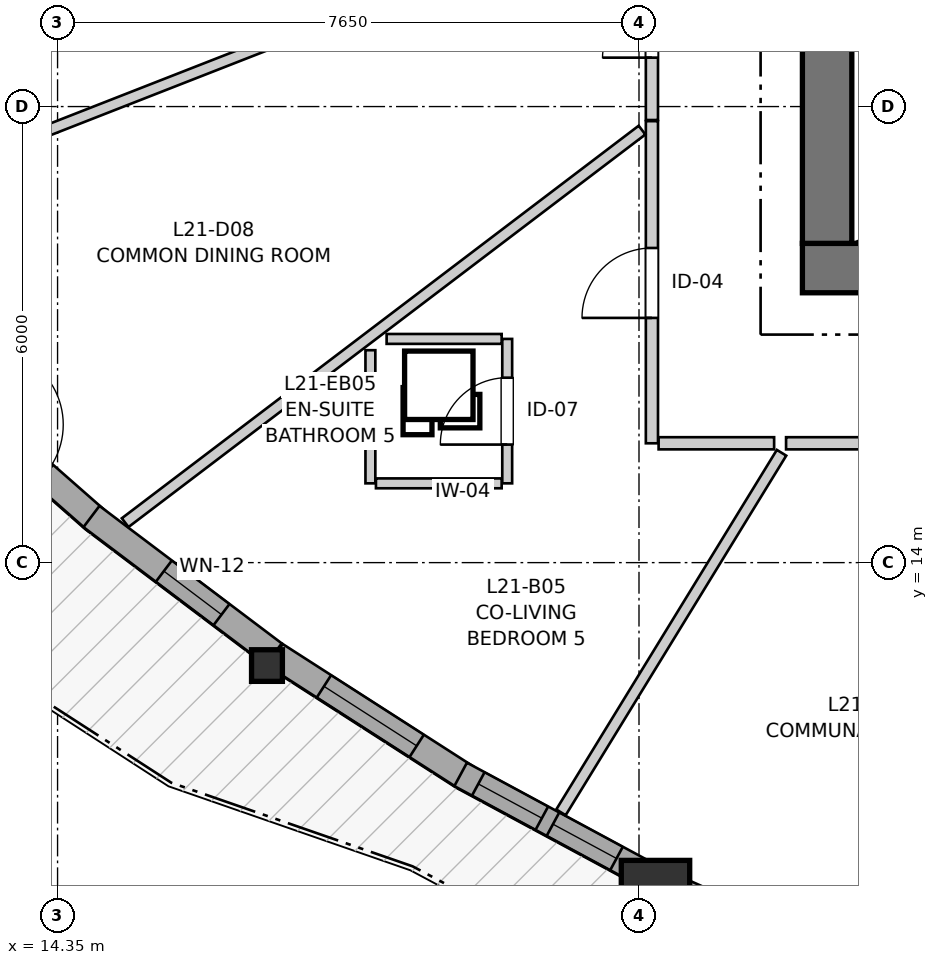
"""IFC4 building model, lengths in metres.
Left out: names, types, materials, properties, quantities, classifications, styles, units other than length and angle.
Written with IfcOpenShell. Run it as: python <this file> out.ifc"""

import sys

from ifc_helpers import new_model, si_unit, direction, frame, frame_2d, origin, origin_2d, place, context, subcontext, project, spatial, rectangle, i_section, extrude, source, transform, mapped, element, fill, save


model = new_model("IFC4")
c1 = context("Model", 3, precision=1e-05, world=origin(), true_north=direction((0.0, 1.0)))
c2 = subcontext(c1, "Body", "Model", "MODEL_VIEW")
j1 = project(units=[si_unit("LENGTHUNIT", "METRE"), si_unit("PLANEANGLEUNIT", "RADIAN")], contexts=[c1])
p1 = place(None, origin())
s1 = spatial("IfcSite", under=j1, at=p1, CompositionType="ELEMENT")
p2 = place(p1, origin())
s2 = spatial("IfcBuilding", under=s1, at=p2, CompositionType="ELEMENT")
p3 = place(p2, frame((0.0, 0.0, 73.6)))
s3 = spatial("IfcBuildingStorey", under=s2, at=p3, CompositionType="ELEMENT", Elevation=73.6)
p4 = place(p3, frame((24.15, 17.875, 0.0), z_axis=(0.0, 0.0, 1.0), x_axis=(1.0, 0.0, 0.0)))
e1 = element("IfcWall", 1, at=p4, inside=s3, PredefinedType="SHEAR", context=c2, shape_type="SweptSolid", body=[
    extrude(rectangle(XDim=12.4, YDim=0.65, at=frame_2d((6.2, 0.0))), origin(), (0.0, 0.0, 1.0), 2.95),
])
p5 = place(p3, frame((24.475, 33.8, 0.0), z_axis=(0.0, 0.0, 1.0), x_axis=(0.0, -1.0, 0.0)))
e2 = element("IfcWall", 2, at=p5, inside=s3, PredefinedType="SHEAR", context=c2, shape_type="SweptSolid", body=[
    extrude(rectangle(XDim=15.6, YDim=0.65, at=frame_2d((7.8, 0.0))), origin(), (0.0, 0.0, 1.0), 2.95),
])
p6 = place(p5, frame((7.05, 0.0, 0.0)))
e3 = element("IfcOpeningElement", 3, at=p6, cuts=e2, PredefinedType="OPENING", context=c2, shape_type="SweptSolid", body=[
    extrude(rectangle(XDim=1.5, YDim=2.15, at=frame_2d((0.75, 1.075))), frame((0.0, 0.335, 0.0), z_axis=(0.0, -1.0, 0.0), x_axis=(1.0, 0.0, 0.0)), (0.0, 0.0, 1.0), 0.67),
])
p7 = place(p5, frame((3.52, 0.0, 0.0)))
e4 = element("IfcOpeningElement", 4, at=p7, cuts=e2, PredefinedType="OPENING", context=c2, shape_type="SweptSolid", body=[
    extrude(rectangle(XDim=0.86, YDim=2.05, at=frame_2d((0.43, 1.025))), frame((0.0, 0.335, 0.0), z_axis=(0.0, -1.0, 0.0), x_axis=(1.0, 0.0, 0.0)), (0.0, 0.0, 1.0), 0.67),
])
p8 = place(p5, frame((11.22, 0.0, 0.0)))
e5 = element("IfcOpeningElement", 5, at=p8, cuts=e2, PredefinedType="OPENING", context=c2, shape_type="SweptSolid", body=[
    extrude(rectangle(XDim=0.86, YDim=2.05, at=frame_2d((0.43, 1.025))), frame((0.0, 0.335, 0.0), z_axis=(0.0, -1.0, 0.0), x_axis=(1.0, 0.0, 0.0)), (0.0, 0.0, 1.0), 0.67),
])
m1 = source(origin(), c2, "Body", "SweptSolid", [
    extrude(i_section(OverallWidth=0.406, OverallDepth=0.416, WebThickness=0.027, FlangeThickness=0.044, FilletRadius=0.015, at=origin_2d()), origin(), (0.0, 0.0, 1.0), 2.95),
])
p9 = place(p3, frame((17.105, 12.646, 0.0), z_axis=(0.0, 0.0, 1.0), x_axis=(1.0, 0.0, 0.0)))
e6 = element("IfcColumn", 6, at=p9, inside=s3, PredefinedType="PILASTER", context=c2, shape_type="MappedRepresentation", body=[
    mapped(m1, transform((0.0, 0.0, 0.0), x_axis=(1.0, 0.0, 0.0), y_axis=(0.0, 1.0, 0.0), z_axis=(0.0, 0.0, 1.0), scale=1.0)),
])
m2 = source(origin(), c2, "Body", "SweptSolid", [
    extrude(rectangle(XDim=0.9, YDim=0.9, at=origin_2d()), origin(), (0.0, 0.0, 1.0), 2.95),
])
p10 = place(p3, frame((22.217, 9.633, 0.0), z_axis=(0.0, 0.0, 1.0), x_axis=(1.0, 0.0, 0.0)))
e7 = element("IfcColumn", 7, at=p10, inside=s3, PredefinedType="COLUMN", context=c2, shape_type="MappedRepresentation", body=[
    mapped(m2, transform((0.0, 0.0, 0.0), x_axis=(1.0, 0.0, 0.0), y_axis=(0.0, 1.0, 0.0), z_axis=(0.0, 0.0, 1.0), scale=1.0)),
])
p11 = place(p3, frame((12.736, 16.419, 0.0), z_axis=(0.0, 0.0, 1.0), x_axis=(0.751507962483, -0.659724019818, 0.0)))
e8 = element("IfcWall", 8, at=p11, inside=s3, PredefinedType="SOLIDWALL", context=c2, shape_type="SweptSolid", body=[
    extrude(rectangle(XDim=2.833, YDim=0.35, at=frame_2d((1.417, 0.0))), origin(), (0.0, 0.0, 1.0), 2.48),
])
p12 = place(p11, frame((0.917, 0.0, 0.0)))
e9 = element("IfcOpeningElement", 9, at=p12, cuts=e8, PredefinedType="OPENING", context=c2, shape_type="SweptSolid", body=[
    extrude(rectangle(XDim=1.0, YDim=2.1, at=frame_2d((0.5, 1.05))), frame((0.0, 0.185, 0.0), z_axis=(0.0, -1.0, 0.0), x_axis=(1.0, 0.0, 0.0)), (0.0, 0.0, 1.0), 0.37),
])
p13 = place(p3, frame((14.796, 14.606, 0.0), z_axis=(0.0, 0.0, 1.0), x_axis=(0.79839776153, -0.602130396496, 0.0)))
e10 = element("IfcWall", 10, at=p13, inside=s3, PredefinedType="SOLIDWALL", context=c2, shape_type="SweptSolid", body=[
    extrude(rectangle(XDim=3.004, YDim=0.35, at=frame_2d((1.502, 0.0))), origin(), (0.0, 0.0, 1.0), 2.48),
])
p14 = place(p13, frame((1.193, 0.0, 0.82)))
e11 = element("IfcOpeningElement", 11, at=p14, cuts=e10, PredefinedType="OPENING", context=c2, shape_type="SweptSolid", body=[
    extrude(rectangle(XDim=0.95, YDim=1.35, at=frame_2d((0.475, 0.675))), frame((0.0, 0.185, 0.0), z_axis=(0.0, -1.0, 0.0), x_axis=(1.0, 0.0, 0.0)), (0.0, 0.0, 1.0), 0.37),
])
p15 = place(p3, frame((17.217, 12.782, 0.0), z_axis=(0.0, 0.0, 1.0), x_axis=(0.841568610443, -0.540150232729, 0.0)))
e12 = element("IfcWall", 12, at=p15, inside=s3, PredefinedType="SOLIDWALL", context=c2, shape_type="SweptSolid", body=[
    extrude(rectangle(XDim=2.987, YDim=0.35, at=frame_2d((1.494, 0.0))), origin(), (0.0, 0.0, 1.0), 2.48),
])
p16 = place(p15, frame((0.759, 0.0, 0.82)))
e13 = element("IfcOpeningElement", 13, at=p16, cuts=e12, PredefinedType="OPENING", context=c2, shape_type="SweptSolid", body=[
    extrude(rectangle(XDim=1.45, YDim=1.25, at=frame_2d((0.725, 0.625))), frame((0.0, 0.185, 0.0), z_axis=(0.0, -1.0, 0.0), x_axis=(1.0, 0.0, 0.0)), (0.0, 0.0, 1.0), 0.37),
])
p17 = place(p3, frame((19.654, 11.214, 0.0), z_axis=(0.0, 0.0, 1.0), x_axis=(0.880112978449, -0.474764304857, 0.0)))
e14 = element("IfcWall", 14, at=p17, inside=s3, PredefinedType="SOLIDWALL", context=c2, shape_type="SweptSolid", body=[
    extrude(rectangle(XDim=2.782, YDim=0.35, at=frame_2d((1.391, 0.0))), origin(), (0.0, 0.0, 1.0), 2.48),
])
p18 = place(p17, frame((0.264, 0.0, 0.82)))
e15 = element("IfcOpeningElement", 15, at=p18, cuts=e14, PredefinedType="OPENING", context=c2, shape_type="SweptSolid", body=[
    extrude(rectangle(XDim=0.95, YDim=1.35, at=frame_2d((0.475, 0.675))), frame((0.0, 0.185, 0.0), z_axis=(0.0, -1.0, 0.0), x_axis=(1.0, 0.0, 0.0)), (0.0, 0.0, 1.0), 0.37),
])
p19 = place(p17, frame((1.38, 0.0, 0.82)))
e16 = element("IfcOpeningElement", 16, at=p19, cuts=e14, PredefinedType="OPENING", context=c2, shape_type="SweptSolid", body=[
    extrude(rectangle(XDim=0.95, YDim=1.35, at=frame_2d((0.475, 0.675))), frame((0.0, 0.185, 0.0), z_axis=(0.0, -1.0, 0.0), x_axis=(1.0, 0.0, 0.0)), (0.0, 0.0, 1.0), 0.37),
])
p20 = place(p3, frame((22.494, 9.701, 0.0), z_axis=(0.0, 0.0, 1.0), x_axis=(0.913444316629, -0.406963733542, 0.0)))
e17 = element("IfcWall", 17, at=p20, inside=s3, PredefinedType="SOLIDWALL", context=c2, shape_type="SweptSolid", body=[
    extrude(rectangle(XDim=2.799, YDim=0.35, at=frame_2d((1.399, 0.0))), origin(), (0.0, 0.0, 1.0), 2.48),
])
p21 = place(p20, frame((0.669, 0.0, 0.82)))
e18 = element("IfcOpeningElement", 18, at=p21, cuts=e17, PredefinedType="OPENING", context=c2, shape_type="SweptSolid", body=[
    extrude(rectangle(XDim=1.45, YDim=1.25, at=frame_2d((0.725, 0.625))), frame((0.0, 0.185, 0.0), z_axis=(0.0, -1.0, 0.0), x_axis=(1.0, 0.0, 0.0)), (0.0, 0.0, 1.0), 0.37),
])
p22 = place(p3, frame((28.359, 15.57, 0.0), z_axis=(0.0, 0.0, 1.0), x_axis=(-1.0, 0.0, 0.0)))
e19 = element("IfcWall", 19, at=p22, inside=s3, PredefinedType="PARTITIONING", context=c2, shape_type="SweptSolid", body=[
    extrude(rectangle(XDim=4.424, YDim=0.16, at=frame_2d((2.212, 0.0))), origin(), (0.0, 0.0, 1.0), 2.95),
])
p23 = place(p22, frame((1.561, 0.0, 0.0)))
e20 = element("IfcOpeningElement", 20, at=p23, cuts=e19, PredefinedType="OPENING", context=c2, shape_type="SweptSolid", body=[
    extrude(rectangle(XDim=1.3, YDim=2.1, at=frame_2d((0.65, 1.05))), frame((0.0, 0.09, 0.0), z_axis=(0.0, -1.0, 0.0), x_axis=(1.0, 0.0, 0.0)), (0.0, 0.0, 1.0), 0.18),
])
p24 = place(p3, frame((22.17, 15.57, 0.0), z_axis=(0.0, 0.0, 1.0), x_axis=(0.0, 1.0, 0.0)))
e21 = element("IfcWall", 21, at=p24, inside=s3, PredefinedType="PARTITIONING", context=c2, shape_type="SweptSolid", body=[
    extrude(rectangle(XDim=4.238, YDim=0.16, at=frame_2d((2.119, 0.0))), origin(), (0.0, 0.0, 1.0), 2.95),
])
p25 = place(p24, frame((1.649, 0.0, 0.0)))
e22 = element("IfcOpeningElement", 22, at=p25, cuts=e21, PredefinedType="OPENING", context=c2, shape_type="SweptSolid", body=[
    extrude(rectangle(XDim=0.92, YDim=2.1, at=frame_2d((0.46, 1.05))), frame((0.0, 0.09, 0.0), z_axis=(0.0, -1.0, 0.0), x_axis=(1.0, 0.0, 0.0)), (0.0, 0.0, 1.0), 0.18),
])
p26 = place(p3, frame((22.17, 19.823, 0.0), z_axis=(0.0, 0.0, 1.0), x_axis=(0.0, 1.0, 0.0)))
e23 = element("IfcWall", 23, at=p26, inside=s3, PredefinedType="PARTITIONING", context=c2, shape_type="SweptSolid", body=[
    extrude(rectangle(XDim=2.991, YDim=0.16, at=frame_2d((1.496, 0.0))), origin(), (0.0, 0.0, 1.0), 2.95),
])
p27 = place(p26, frame((0.821, 0.0, 0.0)))
e24 = element("IfcOpeningElement", 24, at=p27, cuts=e23, PredefinedType="OPENING", context=c2, shape_type="SweptSolid", body=[
    extrude(rectangle(XDim=1.3, YDim=2.1, at=frame_2d((0.65, 1.05))), frame((0.0, 0.09, 0.0), z_axis=(0.0, -1.0, 0.0), x_axis=(1.0, 0.0, 0.0)), (0.0, 0.0, 1.0), 0.18),
])
p28 = place(p3, frame((20.266, 15.043, 0.0), z_axis=(0.0, 0.0, 1.0), x_axis=(0.0, 1.0, 0.0)))
e25 = element("IfcWall", 25, at=p28, inside=s3, PredefinedType="PARTITIONING", context=c2, shape_type="SweptSolid", body=[
    extrude(rectangle(XDim=1.9, YDim=0.13, at=frame_2d((0.95, 0.0))), origin(), (0.0, 0.0, 1.0), 2.95),
])
p29 = place(p28, frame((0.51, 0.0, 0.0)))
e26 = element("IfcOpeningElement", 26, at=p29, cuts=e25, PredefinedType="OPENING", context=c2, shape_type="SweptSolid", body=[
    extrude(rectangle(XDim=0.88, YDim=2.05, at=frame_2d((0.44, 1.025))), frame((0.0, 0.075, 0.0), z_axis=(0.0, -1.0, 0.0), x_axis=(1.0, 0.0, 0.0)), (0.0, 0.0, 1.0), 0.15),
])
p30 = place(p3, frame((10.998, 18.425, 0.0), z_axis=(0.0, 0.0, 1.0), x_axis=(0.931213049878, 0.364475315676, 0.0)))
e27 = element("IfcWall", 27, at=p30, inside=s3, PredefinedType="PARTITIONING", context=c2, shape_type="SweptSolid", body=[
    extrude(rectangle(XDim=11.875, YDim=0.145, at=frame_2d((5.938, 0.0))), origin(), (0.0, 0.0, 1.0), 2.95),
])
p31 = place(p3, frame((15.239, 14.526, 0.0), z_axis=(0.0, 0.0, 1.0), x_axis=(0.796393529077, 0.604778758592, 0.0)))
e28 = element("IfcWall", 28, at=p31, inside=s3, PredefinedType="PARTITIONING", context=c2, shape_type="SweptSolid", body=[
    extrude(rectangle(XDim=8.539, YDim=0.145, at=frame_2d((4.27, 0.0))), origin(), (0.0, 0.0, 1.0), 2.95),
])
p32 = place(p3, frame((20.973, 10.715, 0.0), z_axis=(0.0, 0.0, 1.0), x_axis=(0.522906546436, 0.852390018533, 0.0)))
e29 = element("IfcWall", 29, at=p32, inside=s3, PredefinedType="PARTITIONING", context=c2, shape_type="SweptSolid", body=[
    extrude(rectangle(XDim=5.55, YDim=0.145, at=frame_2d((2.775, 0.0))), origin(), (0.0, 0.0, 1.0), 2.95),
])
p33 = place(p3, frame((18.466, 15.043, 0.0), z_axis=(0.0, 0.0, 1.0), x_axis=(0.0, 1.0, 0.0)))
e30 = element("IfcWall", 30, at=p33, inside=s3, PredefinedType="PARTITIONING", context=c2, shape_type="SweptSolid", body=[
    extrude(rectangle(XDim=1.752, YDim=0.13, at=frame_2d((0.876, 0.0))), origin(), (0.0, 0.0, 1.0), 2.95),
])
p34 = place(p3, frame((18.679, 16.943, 0.0), z_axis=(0.0, 0.0, 1.0), x_axis=(1.0, 0.0, 0.0)))
e31 = element("IfcWall", 31, at=p34, inside=s3, PredefinedType="PARTITIONING", context=c2, shape_type="SweptSolid", body=[
    extrude(rectangle(XDim=1.514, YDim=0.13, at=frame_2d((0.757, 0.0))), origin(), (0.0, 0.0, 1.0), 2.95),
])
p35 = place(p3, frame((18.539, 15.043, 0.0), z_axis=(0.0, 0.0, 1.0), x_axis=(1.0, 0.0, 0.0)))
e32 = element("IfcWall", 32, at=p35, inside=s3, PredefinedType="PARTITIONING", context=c2, shape_type="SweptSolid", body=[
    extrude(rectangle(XDim=1.654, YDim=0.13, at=frame_2d((0.827, 0.0))), origin(), (0.0, 0.0, 1.0), 2.95),
])
p36 = place(p3, frame((22.258, 15.57, 0.0), z_axis=(0.0, 0.0, 1.0), x_axis=(1.0, 0.0, 0.0)))
e33 = element("IfcWall", 33, at=p36, inside=s3, PredefinedType="PARTITIONING", context=c2, shape_type="SweptSolid", body=[
    extrude(rectangle(XDim=1.52, YDim=0.16, at=frame_2d((0.76, 0.0))), origin(), (0.0, 0.0, 1.0), 2.95),
])
m3 = source(origin(), c2, "Body", "SweptSolid", [
    extrude(rectangle(XDim=0.95, YDim=1.35, at=frame_2d((0.475, 0.675))), frame((0.0, 0.03, 0.0), z_axis=(0.0, -1.0, 0.0), x_axis=(1.0, 0.0, 0.0)), (0.0, 0.0, 1.0), 0.06),
])
p37 = place(p14, origin())
e34 = element("IfcWindow", 34, at=p37, inside=s3, PartitioningType="SINGLE_PANEL", PredefinedType="WINDOW", context=c2, shape_type="MappedRepresentation", body=[
    mapped(m3, transform((0.0, 0.0, 0.0), x_axis=(1.0, 0.0, 0.0), y_axis=(0.0, 1.0, 0.0), z_axis=(0.0, 0.0, 1.0), scale=1.0)),
])
fill(e11, e34)
m4 = source(origin(), c2, "Body", "SweptSolid", [
    extrude(rectangle(XDim=1.45, YDim=1.25, at=frame_2d((0.725, 0.625))), frame((0.0, 0.03, 0.0), z_axis=(0.0, -1.0, 0.0), x_axis=(1.0, 0.0, 0.0)), (0.0, 0.0, 1.0), 0.06),
])
p38 = place(p16, origin())
e35 = element("IfcWindow", 35, at=p38, inside=s3, PartitioningType="SINGLE_PANEL", PredefinedType="WINDOW", context=c2, shape_type="MappedRepresentation", body=[
    mapped(m4, transform((0.0, 0.0, 0.0), x_axis=(1.0, 0.0, 0.0), y_axis=(0.0, 1.0, 0.0), z_axis=(0.0, 0.0, 1.0), scale=1.0)),
])
fill(e13, e35)
p39 = place(p18, origin())
e36 = element("IfcWindow", 36, at=p39, inside=s3, PartitioningType="SINGLE_PANEL", PredefinedType="WINDOW", context=c2, shape_type="MappedRepresentation", body=[
    mapped(m3, transform((0.0, 0.0, 0.0), x_axis=(1.0, 0.0, 0.0), y_axis=(0.0, 1.0, 0.0), z_axis=(0.0, 0.0, 1.0), scale=1.0)),
])
fill(e15, e36)
p40 = place(p19, origin())
e37 = element("IfcWindow", 37, at=p40, inside=s3, PartitioningType="SINGLE_PANEL", PredefinedType="WINDOW", context=c2, shape_type="MappedRepresentation", body=[
    mapped(m3, transform((0.0, 0.0, 0.0), x_axis=(1.0, 0.0, 0.0), y_axis=(0.0, 1.0, 0.0), z_axis=(0.0, 0.0, 1.0), scale=1.0)),
])
fill(e16, e37)
m5 = source(origin(), c2, "Body", "SweptSolid", [
    extrude(rectangle(XDim=0.92, YDim=2.1, at=frame_2d((0.46, 1.05))), frame((0.0, 0.025, 0.0), z_axis=(0.0, -1.0, 0.0), x_axis=(1.0, 0.0, 0.0)), (0.0, 0.0, 1.0), 0.05),
])
p41 = place(p25, origin())
e38 = element("IfcDoor", 38, at=p41, inside=s3, OperationType="SINGLE_SWING_LEFT", PredefinedType="DOOR", context=c2, shape_type="MappedRepresentation", body=[
    mapped(m5, transform((0.0, 0.0, 0.0), x_axis=(1.0, 0.0, 0.0), y_axis=(0.0, 1.0, 0.0), z_axis=(0.0, 0.0, 1.0), scale=1.0)),
])
fill(e22, e38)
m6 = source(origin(), c2, "Body", "SweptSolid", [
    extrude(rectangle(XDim=1.3, YDim=2.1, at=frame_2d((0.65, 1.05))), frame((0.0, 0.025, 0.0), z_axis=(0.0, -1.0, 0.0), x_axis=(1.0, 0.0, 0.0)), (0.0, 0.0, 1.0), 0.05),
])
p42 = place(p27, origin())
e39 = element("IfcDoor", 39, at=p42, inside=s3, OperationType="DOUBLE_DOOR_SINGLE_SWING", PredefinedType="DOOR", context=c2, shape_type="MappedRepresentation", body=[
    mapped(m6, transform((0.0, 0.0, 0.0), x_axis=(1.0, 0.0, 0.0), y_axis=(0.0, 1.0, 0.0), z_axis=(0.0, 0.0, 1.0), scale=1.0)),
])
fill(e24, e39)
m7 = source(origin(), c2, "Body", "SweptSolid", [
    extrude(rectangle(XDim=0.88, YDim=2.05, at=frame_2d((0.44, 1.025))), frame((0.0, 0.025, 0.0), z_axis=(0.0, -1.0, 0.0), x_axis=(1.0, 0.0, 0.0)), (0.0, 0.0, 1.0), 0.05),
])
p43 = place(p29, origin())
e40 = element("IfcDoor", 40, at=p43, inside=s3, OperationType="SINGLE_SWING_LEFT", PredefinedType="DOOR", context=c2, shape_type="MappedRepresentation", body=[
    mapped(m7, transform((0.0, 0.0, 0.0), x_axis=(1.0, 0.0, 0.0), y_axis=(0.0, 1.0, 0.0), z_axis=(0.0, 0.0, 1.0), scale=1.0)),
])
fill(e26, e40)
save(model, sys.argv[1])
